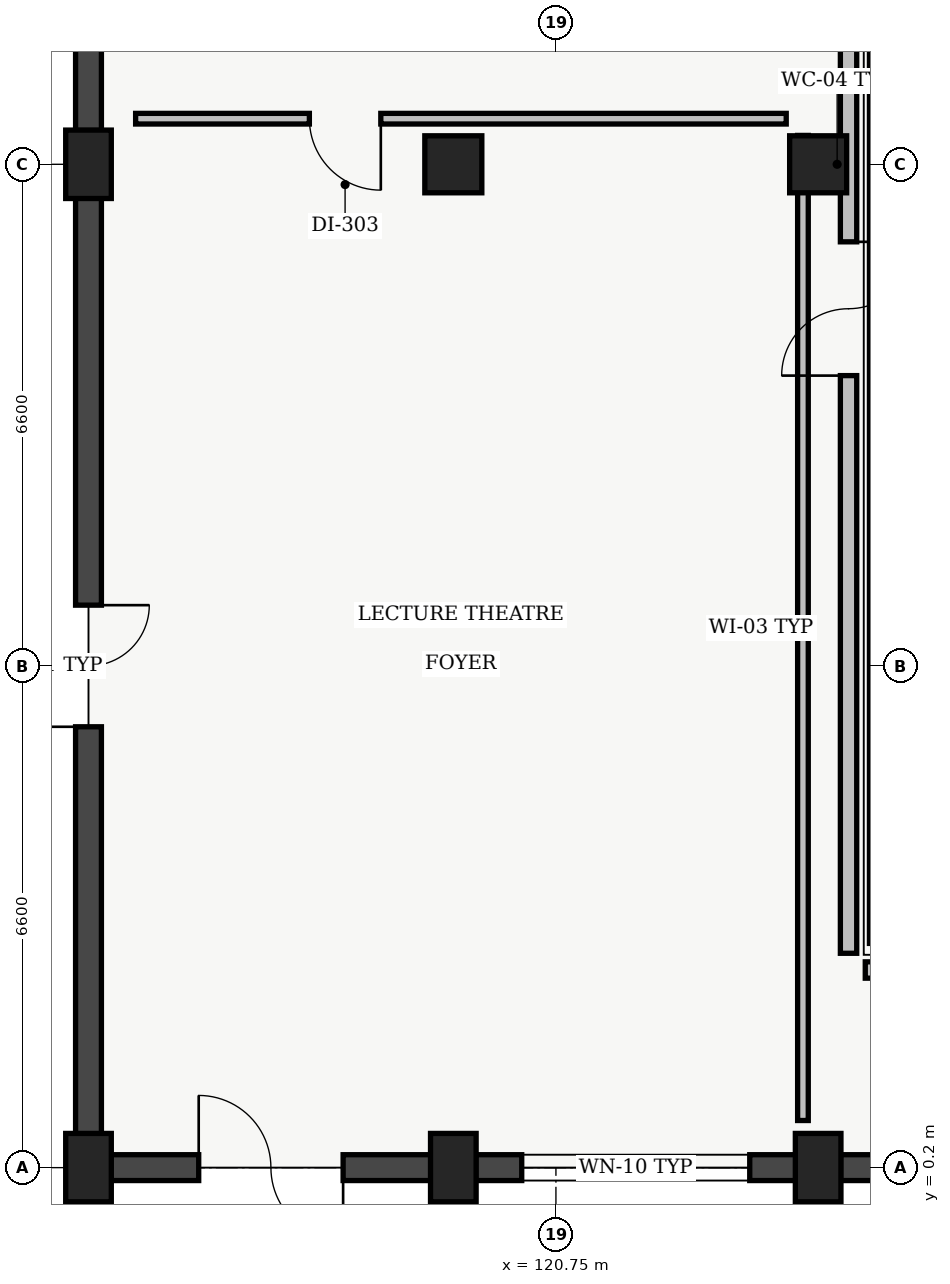
"""IFC4 building model, lengths in metres.
Left out: names, types, materials, properties, quantities, classifications, styles, units other than length and angle.
Written with IfcOpenShell. Run it as: python <this file> out.ifc"""

import sys

from ifc_helpers import new_model, si_unit, direction, frame, frame_2d, origin, origin_2d, place, context, subcontext, project, spatial, rectangle, circle, extrude, element, fill, save


model = new_model("IFC4")
c1 = context("Model", 3, precision=1e-05, world=origin(), true_north=direction((0.0, 1.0)))
c2 = subcontext(c1, "Body", "Model", "MODEL_VIEW")
j1 = project(units=[si_unit("LENGTHUNIT", "METRE"), si_unit("PLANEANGLEUNIT", "RADIAN")], contexts=[c1])
p1 = place(None, origin())
s1 = spatial("IfcSite", under=j1, at=p1, CompositionType="ELEMENT")
p2 = place(p1, origin())
s2 = spatial("IfcBuilding", under=s1, at=p2, CompositionType="ELEMENT")
p3 = place(p2, origin())
s3 = spatial("IfcBuildingStorey", under=s2, at=p3, CompositionType="ELEMENT", Elevation=0.0)
p4 = place(p3, frame((125.0, 3.15, 0.0), z_axis=(0.0, 0.0, 1.0), x_axis=(0.0, 1.0, 0.0)))
e1 = element("IfcWall", 1, at=p4, inside=s3, PredefinedType="SHEAR", context=c2, shape_type="SweptSolid", body=[
    extrude(rectangle(XDim=20.5, YDim=0.25, at=frame_2d((10.25, 0.0))), origin(), (0.0, 0.0, 1.0), 0.315),
])
for number, where, z_axis, x_axis in (
    (2, (114.6, 0.2, 0.0), (0.0, 0.0, 1.0), (1.0, 0.0, 0.0)),
    (3, (114.6, 13.4, 0.0), (0.0, 0.0, 1.0), (1.0, 0.0, 0.0)),
    (4, (119.4, 0.2, 0.0), (0.0, 0.0, 1.0), (1.0, 0.0, 0.0)),
):
    element("IfcColumn", number, at=place(p3, frame(where, z_axis=z_axis, x_axis=x_axis)), inside=s3, PredefinedType="COLUMN", context=c2, shape_type="SweptSolid", body=[
        extrude(rectangle(XDim=0.6, YDim=0.9, at=origin_2d()), origin(), (0.0, 0.0, 1.0), 4.68),
    ])
p5 = place(p3, frame((119.4, 13.4, 0.0), z_axis=(0.0, 0.0, 1.0), x_axis=(1.0, 0.0, 0.0)))
e5 = element("IfcColumn", 5, at=p5, inside=s3, PredefinedType="COLUMN", context=c2, shape_type="SweptSolid", body=[
    extrude(circle(Radius=0.375, at=origin_2d()), origin(), (0.0, 0.0, 1.0), 4.68),
])
p6 = place(p3, frame((124.2, 0.2, 0.0), z_axis=(0.0, 0.0, 1.0), x_axis=(1.0, 0.0, 0.0)))
e6 = element("IfcColumn", 6, at=p6, inside=s3, PredefinedType="COLUMN", context=c2, shape_type="SweptSolid", body=[
    extrude(rectangle(XDim=0.6, YDim=0.9, at=origin_2d()), origin(), (0.0, 0.0, 1.0), 4.68),
])
p7 = place(p3, frame((124.2, 13.4, 0.0), z_axis=(0.0, 0.0, 1.0), x_axis=(1.0, 0.0, 0.0)))
e7 = element("IfcColumn", 7, at=p7, inside=s3, PredefinedType="COLUMN", context=c2, shape_type="SweptSolid", body=[
    extrude(circle(Radius=0.375, at=origin_2d()), origin(), (0.0, 0.0, 1.0), 4.68),
])
p8 = place(p3, frame((114.6, 0.645, 0.0), z_axis=(0.0, 0.0, 1.0), x_axis=(0.0, 1.0, 0.0)))
e8 = element("IfcWall", 8, at=p8, inside=s3, PredefinedType="SOLIDWALL", context=c2, shape_type="SweptSolid", body=[
    extrude(rectangle(XDim=12.31, YDim=0.34, at=frame_2d((6.155, 0.0))), origin(), (0.0, 0.0, 1.0), 4.215),
])
p9 = place(p8, frame((5.355, 0.0, 0.0)))
e9 = element("IfcOpeningElement", 9, at=p9, cuts=e8, PredefinedType="OPENING", context=c2, shape_type="SweptSolid", body=[
    extrude(rectangle(XDim=1.6, YDim=2.2, at=frame_2d((0.8, 1.1))), frame((0.0, 0.17, 0.0), z_axis=(0.0, -1.0, 0.0), x_axis=(1.0, 0.0, 0.0)), (0.0, 0.0, 1.0), 0.34),
])
p10 = place(p3, frame((114.6, 13.845, 0.0), z_axis=(0.0, 0.0, 1.0), x_axis=(0.0, 1.0, 0.0)))
e10 = element("IfcWall", 10, at=p10, inside=s3, PredefinedType="SOLIDWALL", context=c2, shape_type="SweptSolid", body=[
    extrude(rectangle(XDim=12.31, YDim=0.34, at=frame_2d((6.155, 0.0))), origin(), (0.0, 0.0, 1.0), 4.215),
])
p11 = place(p10, frame((6.2, 0.0, 0.0)))
e11 = element("IfcOpeningElement", 11, at=p11, cuts=e10, PredefinedType="OPENING", context=c2, shape_type="SweptSolid", body=[
    extrude(rectangle(XDim=2.0, YDim=2.25, at=frame_2d((1.0, 1.125))), frame((0.0, 0.17, 0.0), z_axis=(0.0, -1.0, 0.0), x_axis=(1.0, 0.0, 0.0)), (0.0, 0.0, 1.0), 0.34),
])
p12 = place(p3, frame((128.705, 0.2, 0.0), z_axis=(0.0, 0.0, 1.0), x_axis=(-1.0, 0.0, 0.0)))
e12 = element("IfcWall", 12, at=p12, inside=s3, PredefinedType="SOLIDWALL", context=c2, shape_type="SweptSolid", body=[
    extrude(rectangle(XDim=4.21, YDim=0.34, at=frame_2d((2.105, 0.0))), origin(), (0.0, 0.0, 1.0), 4.215),
])
p13 = place(p3, frame((123.905, 0.2, 0.0), z_axis=(0.0, 0.0, 1.0), x_axis=(-1.0, 0.0, 0.0)))
e13 = element("IfcWall", 13, at=p13, inside=s3, PredefinedType="SOLIDWALL", context=c2, shape_type="SweptSolid", body=[
    extrude(rectangle(XDim=4.21, YDim=0.34, at=frame_2d((2.105, 0.0))), origin(), (0.0, 0.0, 1.0), 4.215),
])
p14 = place(p13, frame((0.605, 0.0, 0.95)))
e14 = element("IfcOpeningElement", 14, at=p14, cuts=e13, PredefinedType="OPENING", context=c2, shape_type="SweptSolid", body=[
    extrude(rectangle(XDim=3.0, YDim=1.65, at=frame_2d((1.5, 0.825))), frame((0.0, 0.17, 0.0), z_axis=(0.0, -1.0, 0.0), x_axis=(1.0, 0.0, 0.0)), (0.0, 0.0, 1.0), 0.34),
])
p15 = place(p3, frame((119.105, 0.2, 0.0), z_axis=(0.0, 0.0, 1.0), x_axis=(-1.0, 0.0, 0.0)))
e15 = element("IfcWall", 15, at=p15, inside=s3, PredefinedType="SOLIDWALL", context=c2, shape_type="SweptSolid", body=[
    extrude(rectangle(XDim=4.21, YDim=0.34, at=frame_2d((2.105, 0.0))), origin(), (0.0, 0.0, 1.0), 4.215),
])
p16 = place(p15, frame((1.155, 0.0, 0.0)))
e16 = element("IfcOpeningElement", 16, at=p16, cuts=e15, PredefinedType="OPENING", context=c2, shape_type="SweptSolid", body=[
    extrude(rectangle(XDim=1.9, YDim=2.25, at=frame_2d((0.95, 1.125))), frame((0.0, 0.17, 0.0), z_axis=(0.0, -1.0, 0.0), x_axis=(1.0, 0.0, 0.0)), (0.0, 0.0, 1.0), 0.34),
])
p17 = place(p3, frame((124.0, 0.82, 0.0), z_axis=(0.0, 0.0, 1.0), x_axis=(0.0, 1.0, 0.0)))
e17 = element("IfcWall", 17, at=p17, inside=s3, PredefinedType="PARTITIONING", context=c2, shape_type="SweptSolid", body=[
    extrude(rectangle(XDim=12.96, YDim=0.14, at=frame_2d((6.48, 0.0))), origin(), (0.0, 0.0, 1.0), 4.55),
])
p18 = place(p3, frame((123.78, 14.0, 0.0), z_axis=(0.0, 0.0, 1.0), x_axis=(-1.0, 0.0, 0.0)))
e18 = element("IfcWall", 18, at=p18, inside=s3, PredefinedType="PARTITIONING", context=c2, shape_type="SweptSolid", body=[
    extrude(rectangle(XDim=8.56, YDim=0.14, at=frame_2d((4.28, 0.0))), origin(), (0.0, 0.0, 1.0), 4.55),
])
p19 = place(p18, frame((5.334, 0.0, 0.0)))
e19 = element("IfcOpeningElement", 19, at=p19, cuts=e18, PredefinedType="OPENING", context=c2, shape_type="SweptSolid", body=[
    extrude(rectangle(XDim=0.94, YDim=2.12, at=frame_2d((0.47, 1.06))), frame((0.0, 0.07, 0.0), z_axis=(0.0, -1.0, 0.0), x_axis=(1.0, 0.0, 0.0)), (0.0, 0.0, 1.0), 0.14),
])
p20 = place(p3, frame((124.82, 2.8, 0.0), z_axis=(0.0, 0.0, 1.0), x_axis=(1.0, 0.0, 0.0)))
e20 = element("IfcWall", 20, at=p20, inside=s3, PredefinedType="SOLIDWALL", context=c2, shape_type="SweptSolid", body=[
    extrude(rectangle(XDim=22.76, YDim=0.215, at=frame_2d((11.38, 0.0))), origin(), (0.0, 0.0, 1.0), 4.55),
])
p21 = place(p3, frame((124.6, 23.78, 0.0), z_axis=(0.0, 0.0, 1.0), x_axis=(0.0, -1.0, 0.0)))
e21 = element("IfcWall", 21, at=p21, inside=s3, PredefinedType="SOLIDWALL", context=c2, shape_type="SweptSolid", body=[
    extrude(rectangle(XDim=20.76, YDim=0.215, at=frame_2d((10.38, 0.0))), origin(), (0.0, 0.0, 1.0), 4.55),
])
p22 = place(p21, frame((11.4, 0.0, 0.0)))
e22 = element("IfcOpeningElement", 22, at=p22, cuts=e21, PredefinedType="OPENING", context=c2, shape_type="SweptSolid", body=[
    extrude(rectangle(XDim=1.76, YDim=2.25, at=frame_2d((0.88, 1.125))), frame((0.0, 0.107, 0.0), z_axis=(0.0, -1.0, 0.0), x_axis=(1.0, 0.0, 0.0)), (0.0, 0.0, 1.0), 0.215),
])
p23 = place(p9, origin())
e23 = element("IfcDoor", 23, at=p23, inside=s3, OperationType="DOUBLE_DOOR_SINGLE_SWING", PredefinedType="DOOR", context=c2, shape_type="SweptSolid", body=[
    extrude(rectangle(XDim=1.6, YDim=2.2, at=frame_2d((0.8, 1.1))), frame((0.0, 0.025, 0.0), z_axis=(0.0, -1.0, 0.0), x_axis=(1.0, 0.0, 0.0)), (0.0, 0.0, 1.0), 0.05),
])
fill(e9, e23)
p24 = place(p14, origin())
e24 = element("IfcWindow", 24, at=p24, inside=s3, PartitioningType="SINGLE_PANEL", PredefinedType="WINDOW", context=c2, shape_type="SweptSolid", body=[
    extrude(rectangle(XDim=3.0, YDim=1.65, at=frame_2d((1.5, 0.825))), frame((0.0, 0.03, 0.0), z_axis=(0.0, -1.0, 0.0), x_axis=(1.0, 0.0, 0.0)), (0.0, 0.0, 1.0), 0.06),
])
fill(e14, e24)
p25 = place(p16, origin())
e25 = element("IfcDoor", 25, at=p25, inside=s3, OperationType="DOUBLE_DOOR_SINGLE_SWING", PredefinedType="DOOR", context=c2, shape_type="SweptSolid", body=[
    extrude(rectangle(XDim=1.9, YDim=2.25, at=frame_2d((0.95, 1.125))), frame((0.0, 0.025, 0.0), z_axis=(0.0, -1.0, 0.0), x_axis=(1.0, 0.0, 0.0)), (0.0, 0.0, 1.0), 0.05),
])
fill(e16, e25)
p26 = place(p19, origin())
e26 = element("IfcDoor", 26, at=p26, inside=s3, OperationType="SINGLE_SWING_LEFT", PredefinedType="DOOR", context=c2, shape_type="SweptSolid", body=[
    extrude(rectangle(XDim=0.94, YDim=2.12, at=frame_2d((0.47, 1.06))), frame((0.0, 0.025, 0.0), z_axis=(0.0, -1.0, 0.0), x_axis=(1.0, 0.0, 0.0)), (0.0, 0.0, 1.0), 0.05),
])
fill(e19, e26)
p27 = place(p22, origin())
e27 = element("IfcDoor", 27, at=p27, inside=s3, OperationType="DOUBLE_DOOR_SINGLE_SWING", PredefinedType="DOOR", context=c2, shape_type="SweptSolid", body=[
    extrude(rectangle(XDim=1.76, YDim=2.25, at=frame_2d((0.88, 1.125))), frame((0.0, 0.025, 0.0), z_axis=(0.0, -1.0, 0.0), x_axis=(1.0, 0.0, 0.0)), (0.0, 0.0, 1.0), 0.05),
])
fill(e22, e27)
save(model, sys.argv[1])
